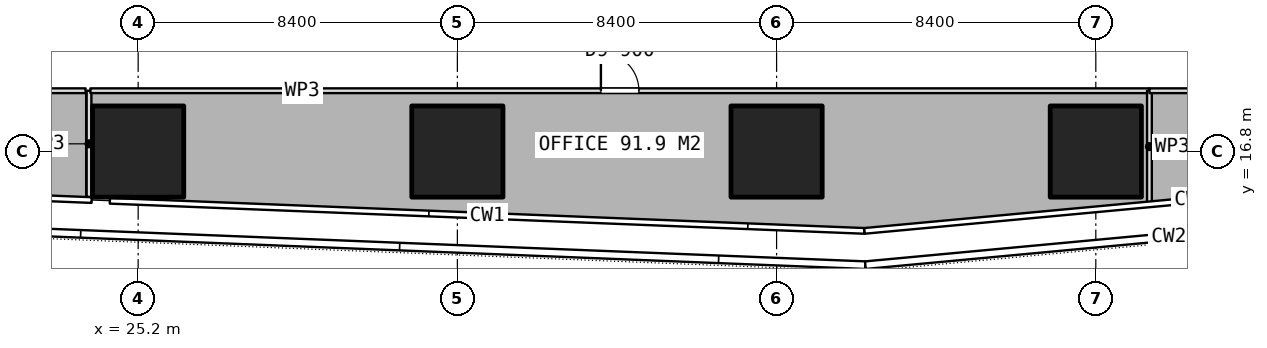
"""IFC4 building model, lengths in metres.
Left out: names, types, materials, properties, quantities, classifications, styles, units other than length and angle.
Written with IfcOpenShell. Run it as: python <this file> out.ifc"""

import sys

from ifc_helpers import new_model, si_unit, direction, frame, frame_2d, origin, origin_2d, place, context, subcontext, project, spatial, rectangle, extrude, element, fill, save


model = new_model("IFC4")
c1 = context("Model", 3, precision=1e-05, world=origin(), true_north=direction((0.0, 1.0)))
c2 = subcontext(c1, "Body", "Model", "MODEL_VIEW")
j1 = project(units=[si_unit("LENGTHUNIT", "METRE"), si_unit("PLANEANGLEUNIT", "RADIAN")], contexts=[c1])
p1 = place(None, origin())
s1 = spatial("IfcSite", under=j1, at=p1, CompositionType="ELEMENT")
p2 = place(p1, origin())
s2 = spatial("IfcBuilding", under=s1, at=p2, CompositionType="ELEMENT")
p3 = place(p2, frame((0.0, 0.0, 228.95)))
s3 = spatial("IfcBuildingStorey", under=s2, at=p3, CompositionType="ELEMENT", Elevation=228.95)
for number, where, z_axis, x_axis in (
    (1, (25.2, 16.8, 0.0), (0.0, 0.0, 1.0), (1.0, 0.0, 0.0)),
    (2, (33.6, 16.8, 0.0), (0.0, 0.0, 1.0), (1.0, 0.0, 0.0)),
    (3, (42.0, 16.8, 0.0), (0.0, 0.0, 1.0), (1.0, 0.0, 0.0)),
    (4, (50.4, 16.8, 0.0), (0.0, 0.0, 1.0), (1.0, 0.0, 0.0)),
):
    element("IfcColumn", number, at=place(p3, frame(where, z_axis=z_axis, x_axis=x_axis)), inside=s3, PredefinedType="COLUMN", context=c2, shape_type="SweptSolid", body=[
        extrude(rectangle(XDim=2.4, YDim=2.4, at=origin_2d()), origin(), (0.0, 0.0, 1.0), 3.75),
    ])
p4 = place(p3, frame((23.907, 15.606, 0.0), z_axis=(0.0, 0.0, 1.0), x_axis=(0.0, 1.0, 0.0)))
e5 = element("IfcWall", 5, at=p4, inside=s3, PredefinedType="PARTITIONING", context=c2, shape_type="SweptSolid", body=[
    extrude(rectangle(XDim=2.794, YDim=0.125, at=frame_2d((1.397, 0.0))), origin(), (0.0, 0.0, 1.0), 3.5),
])
p5 = place(p3, frame((23.944, 18.4, 0.0), z_axis=(0.0, 0.0, 1.0), x_axis=(1.0, 0.0, 0.0)))
e6 = element("IfcWall", 6, at=p5, inside=s3, PredefinedType="PARTITIONING", context=c2, shape_type="SweptSolid", body=[
    extrude(rectangle(XDim=27.867, YDim=0.125, at=frame_2d((13.934, 0.0))), origin(), (0.0, 0.0, 1.0), 3.5),
])
p6 = place(p5, frame((13.433, 0.0, 0.0)))
e7 = element("IfcOpeningElement", 7, at=p6, cuts=e6, PredefinedType="OPENING", context=c2, shape_type="SweptSolid", body=[
    extrude(rectangle(XDim=1.0, YDim=2.1, at=frame_2d((0.5, 1.05))), frame((0.0, 0.073, 0.0), z_axis=(0.0, -1.0, 0.0), x_axis=(1.0, 0.0, 0.0)), (0.0, 0.0, 1.0), 0.145),
])
p7 = place(p3, frame((51.811, 18.4, 0.0), z_axis=(0.0, 0.0, 1.0), x_axis=(0.0, -1.0, 0.0)))
e8 = element("IfcWall", 8, at=p7, inside=s3, PredefinedType="PARTITIONING", context=c2, shape_type="SweptSolid", body=[
    extrude(rectangle(XDim=2.94, YDim=0.125, at=frame_2d((1.47, 0.0))), origin(), (0.0, 0.0, 1.0), 3.5),
])
p8 = place(p3, frame((51.812, 18.4, 0.0), z_axis=(0.0, 0.0, 1.0), x_axis=(1.0, 0.0, 0.0)))
e9 = element("IfcWall", 9, at=p8, inside=s3, PredefinedType="PARTITIONING", context=c2, shape_type="SweptSolid", body=[
    extrude(rectangle(XDim=4.588, YDim=0.125, at=frame_2d((2.294, 0.0))), origin(), (0.0, 0.0, 1.0), 3.5),
])
p9 = place(p8, frame((1.794, 0.0, 0.0)))
e10 = element("IfcOpeningElement", 10, at=p9, cuts=e9, PredefinedType="OPENING", context=c2, shape_type="SweptSolid", body=[
    extrude(rectangle(XDim=1.0, YDim=2.1, at=frame_2d((0.5, 1.05))), frame((0.0, 0.073, 0.0), z_axis=(0.0, -1.0, 0.0), x_axis=(1.0, 0.0, 0.0)), (0.0, 0.0, 1.0), 0.145),
])
p10 = place(p3, frame((19.2, 18.4, 0.0), z_axis=(0.0, 0.0, 1.0), x_axis=(1.0, 0.0, 0.0)))
e11 = element("IfcWall", 11, at=p10, inside=s3, PredefinedType="PARTITIONING", context=c2, shape_type="SweptSolid", body=[
    extrude(rectangle(XDim=4.617, YDim=0.125, at=frame_2d((2.309, 0.0))), origin(), (0.0, 0.0, 1.0), 3.5),
])
p11 = place(p10, frame((1.808, 0.0, 0.0)))
e12 = element("IfcOpeningElement", 12, at=p11, cuts=e11, PredefinedType="OPENING", context=c2, shape_type="SweptSolid", body=[
    extrude(rectangle(XDim=1.0, YDim=2.1, at=frame_2d((0.5, 1.05))), frame((0.0, 0.073, 0.0), z_axis=(0.0, -1.0, 0.0), x_axis=(1.0, 0.0, 0.0)), (0.0, 0.0, 1.0), 0.145),
])
p12 = place(p6, origin())
e13 = element("IfcDoor", 13, at=p12, inside=s3, OperationType="SINGLE_SWING_LEFT", PredefinedType="DOOR", context=c2, shape_type="SweptSolid", body=[
    extrude(rectangle(XDim=1.0, YDim=2.1, at=frame_2d((0.5, 1.05))), frame((0.0, 0.025, 0.0), z_axis=(0.0, -1.0, 0.0), x_axis=(1.0, 0.0, 0.0)), (0.0, 0.0, 1.0), 0.05),
])
fill(e7, e13)
save(model, sys.argv[1])
